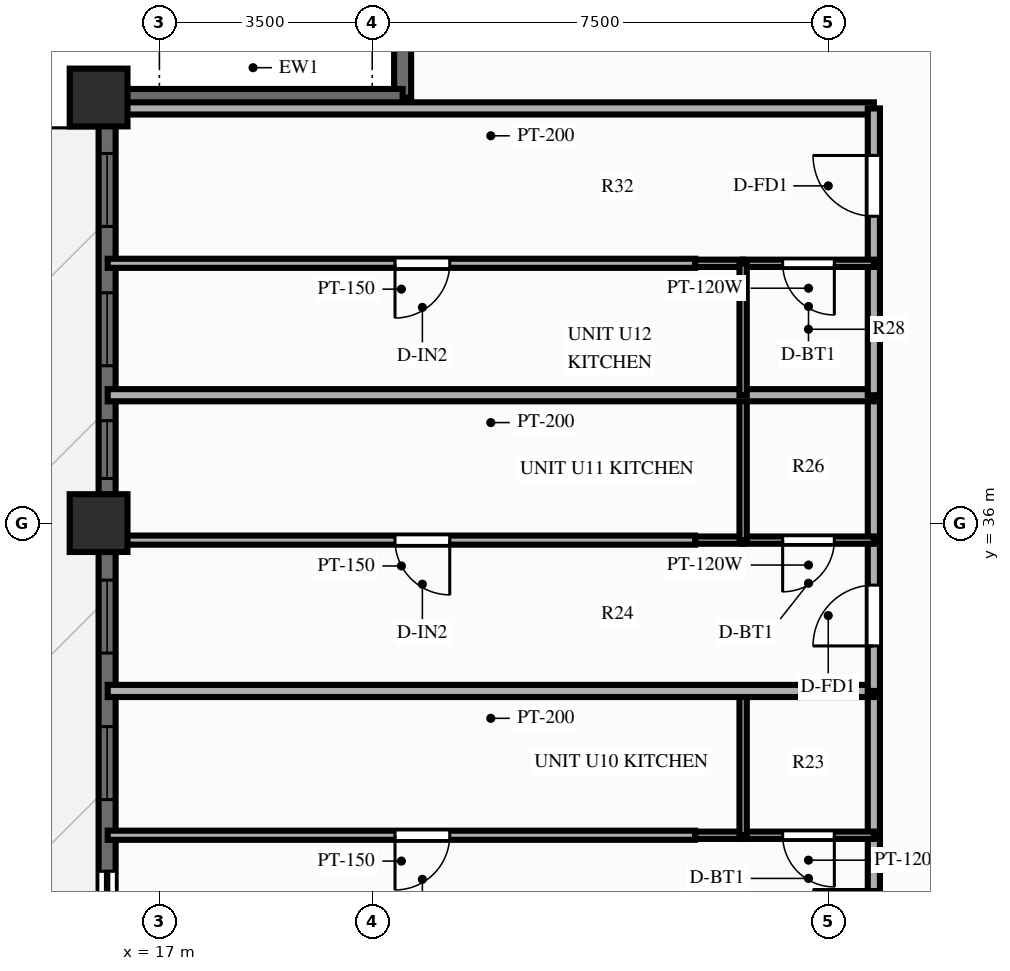
"""IFC4 building model, lengths in metres.
Left out: names, types, materials, properties, quantities, classifications, styles, units other than length and angle.
Written with IfcOpenShell. Run it as: python <this file> out.ifc"""

import sys

from ifc_helpers import new_model, si_unit, direction, frame, frame_2d, origin, origin_2d, place, context, subcontext, project, spatial, rectangle, extrude, source, transform, mapped, element, fill, save


model = new_model("IFC4")
c1 = context("Model", 3, precision=1e-05, world=origin(), true_north=direction((0.0, 1.0)))
c2 = subcontext(c1, "Body", "Model", "MODEL_VIEW")
j1 = project(units=[si_unit("LENGTHUNIT", "METRE"), si_unit("PLANEANGLEUNIT", "RADIAN")], contexts=[c1])
p1 = place(None, origin())
s1 = spatial("IfcSite", under=j1, at=p1, CompositionType="ELEMENT")
p2 = place(p1, origin())
s2 = spatial("IfcBuilding", under=s1, at=p2, CompositionType="ELEMENT")
p3 = place(p2, frame((0.0, 0.0, 163.0)))
s3 = spatial("IfcBuildingStorey", under=s2, at=p3, CompositionType="ELEMENT", Elevation=163.0)
m1 = source(origin(), c2, "Body", "SweptSolid", [
    extrude(rectangle(XDim=0.95, YDim=0.95, at=origin_2d()), origin(), (0.0, 0.0, 1.0), 3.0),
])
for number, where, z_axis, x_axis in (
    (1, (16.0, 43.0, 0.0), (0.0, 0.0, 1.0), (1.0, 0.0, 0.0)),
    (2, (16.0, 36.0, 0.0), (0.0, 0.0, 1.0), (1.0, 0.0, 0.0)),
):
    element("IfcColumn", number, at=place(p3, frame(where, z_axis=z_axis, x_axis=x_axis)), inside=s3, PredefinedType="COLUMN", context=c2, shape_type="MappedRepresentation", body=[
        mapped(m1, transform((0.0, 0.0, 0.0), scale=1.0)),
    ])
p4 = place(p3, frame((16.14, 11.0, 0.0), z_axis=(0.0, 0.0, 1.0), x_axis=(0.0, 1.0, 0.0)))
e3 = element("IfcWall", 3, at=p4, inside=s3, PredefinedType="SOLIDWALL", context=c2, shape_type="SweptSolid", body=[
    extrude(rectangle(XDim=32.0, YDim=0.28, at=frame_2d((16.0, 0.0))), origin(), (0.0, 0.0, 1.0), 2.28),
])
p5 = place(p4, frame((1.001, 0.0, 0.25)))
e4 = element("IfcOpeningElement", 4, at=p5, cuts=e3, PredefinedType="OPENING", context=c2, shape_type="SweptSolid", body=[
    extrude(rectangle(XDim=1.2, YDim=1.5, at=frame_2d((0.6, 0.75))), frame((0.0, 0.152, 0.0), z_axis=(0.0, -1.0, 0.0), x_axis=(1.0, 0.0, 0.0)), (0.0, 0.0, 1.0), 0.304),
])
p6 = place(p4, frame((3.439, 0.0, 0.25)))
e5 = element("IfcOpeningElement", 5, at=p6, cuts=e3, PredefinedType="OPENING", context=c2, shape_type="SweptSolid", body=[
    extrude(rectangle(XDim=1.2, YDim=1.5, at=frame_2d((0.6, 0.75))), frame((0.0, 0.152, 0.0), z_axis=(0.0, -1.0, 0.0), x_axis=(1.0, 0.0, 0.0)), (0.0, 0.0, 1.0), 0.304),
])
p7 = place(p4, frame((5.588, 0.0, 0.25)))
e6 = element("IfcOpeningElement", 6, at=p7, cuts=e3, PredefinedType="OPENING", context=c2, shape_type="SweptSolid", body=[
    extrude(rectangle(XDim=0.7, YDim=1.5, at=frame_2d((0.35, 0.75))), frame((0.0, 0.152, 0.0), z_axis=(0.0, -1.0, 0.0), x_axis=(1.0, 0.0, 0.0)), (0.0, 0.0, 1.0), 0.304),
])
p8 = place(p4, frame((8.085, 0.0, 0.25)))
e7 = element("IfcOpeningElement", 7, at=p8, cuts=e3, PredefinedType="OPENING", context=c2, shape_type="SweptSolid", body=[
    extrude(rectangle(XDim=1.2, YDim=1.5, at=frame_2d((0.6, 0.75))), frame((0.0, 0.152, 0.0), z_axis=(0.0, -1.0, 0.0), x_axis=(1.0, 0.0, 0.0)), (0.0, 0.0, 1.0), 0.304),
])
p9 = place(p4, frame((10.575, 0.0, 0.25)))
e8 = element("IfcOpeningElement", 8, at=p9, cuts=e3, PredefinedType="OPENING", context=c2, shape_type="SweptSolid", body=[
    extrude(rectangle(XDim=1.2, YDim=1.5, at=frame_2d((0.6, 0.75))), frame((0.0, 0.152, 0.0), z_axis=(0.0, -1.0, 0.0), x_axis=(1.0, 0.0, 0.0)), (0.0, 0.0, 1.0), 0.304),
])
p10 = place(p4, frame((13.007, 0.0, 0.25)))
e9 = element("IfcOpeningElement", 9, at=p10, cuts=e3, PredefinedType="OPENING", context=c2, shape_type="SweptSolid", body=[
    extrude(rectangle(XDim=1.2, YDim=1.5, at=frame_2d((0.6, 0.75))), frame((0.0, 0.152, 0.0), z_axis=(0.0, -1.0, 0.0), x_axis=(1.0, 0.0, 0.0)), (0.0, 0.0, 1.0), 0.304),
])
p11 = place(p4, frame((15.4, 0.0, 0.25)))
e10 = element("IfcOpeningElement", 10, at=p11, cuts=e3, PredefinedType="OPENING", context=c2, shape_type="SweptSolid", body=[
    extrude(rectangle(XDim=1.2, YDim=1.5, at=frame_2d((0.6, 0.75))), frame((0.0, 0.152, 0.0), z_axis=(0.0, -1.0, 0.0), x_axis=(1.0, 0.0, 0.0)), (0.0, 0.0, 1.0), 0.304),
])
p12 = place(p4, frame((17.673, 0.0, 0.0)))
e11 = element("IfcOpeningElement", 11, at=p12, cuts=e3, PredefinedType="OPENING", context=c2, shape_type="SweptSolid", body=[
    extrude(rectangle(XDim=1.6, YDim=2.15, at=frame_2d((0.8, 1.075))), frame((0.0, 0.152, 0.0), z_axis=(0.0, -1.0, 0.0), x_axis=(1.0, 0.0, 0.0)), (0.0, 0.0, 1.0), 0.304),
])
p13 = place(p4, frame((20.452, 0.0, 0.25)))
e12 = element("IfcOpeningElement", 12, at=p13, cuts=e3, PredefinedType="OPENING", context=c2, shape_type="SweptSolid", body=[
    extrude(rectangle(XDim=1.2, YDim=1.5, at=frame_2d((0.6, 0.75))), frame((0.0, 0.152, 0.0), z_axis=(0.0, -1.0, 0.0), x_axis=(1.0, 0.0, 0.0)), (0.0, 0.0, 1.0), 0.304),
])
p14 = place(p4, frame((22.862, 0.0, 0.25)))
e13 = element("IfcOpeningElement", 13, at=p14, cuts=e3, PredefinedType="OPENING", context=c2, shape_type="SweptSolid", body=[
    extrude(rectangle(XDim=1.2, YDim=1.5, at=frame_2d((0.6, 0.75))), frame((0.0, 0.152, 0.0), z_axis=(0.0, -1.0, 0.0), x_axis=(1.0, 0.0, 0.0)), (0.0, 0.0, 1.0), 0.304),
])
p15 = place(p4, frame((25.734, 0.0, 0.25)))
e14 = element("IfcOpeningElement", 14, at=p15, cuts=e3, PredefinedType="OPENING", context=c2, shape_type="SweptSolid", body=[
    extrude(rectangle(XDim=0.95, YDim=1.5, at=frame_2d((0.475, 0.75))), frame((0.0, 0.152, 0.0), z_axis=(0.0, -1.0, 0.0), x_axis=(1.0, 0.0, 0.0)), (0.0, 0.0, 1.0), 0.304),
])
p16 = place(p4, frame((27.588, 0.0, 0.25)))
e15 = element("IfcOpeningElement", 15, at=p16, cuts=e3, PredefinedType="OPENING", context=c2, shape_type="SweptSolid", body=[
    extrude(rectangle(XDim=1.2, YDim=1.5, at=frame_2d((0.6, 0.75))), frame((0.0, 0.152, 0.0), z_axis=(0.0, -1.0, 0.0), x_axis=(1.0, 0.0, 0.0)), (0.0, 0.0, 1.0), 0.304),
])
p17 = place(p4, frame((29.879, 0.0, 0.25)))
e16 = element("IfcOpeningElement", 16, at=p17, cuts=e3, PredefinedType="OPENING", context=c2, shape_type="SweptSolid", body=[
    extrude(rectangle(XDim=1.2, YDim=1.5, at=frame_2d((0.6, 0.75))), frame((0.0, 0.152, 0.0), z_axis=(0.0, -1.0, 0.0), x_axis=(1.0, 0.0, 0.0)), (0.0, 0.0, 1.0), 0.304),
])
for number, where, z_axis, x_axis in (
    (17, (21.0, 43.0, 0.0), (0.0, 0.0, 1.0), (0.0, 1.0, 0.0)),
    (18, (16.08, 43.0, 0.0), (0.0, 0.0, 1.0), (1.0, 0.0, 0.0)),
):
    element("IfcWall", number, at=place(p3, frame(where, z_axis=z_axis, x_axis=x_axis)), inside=s3, PredefinedType="SOLIDWALL", context=c2, shape_type="SweptSolid", body=[
        extrude(rectangle(XDim=4.92, YDim=0.28, at=frame_2d((2.46, 0.0))), origin(), (0.0, 0.0, 1.0), 2.28),
    ])
p18 = place(p3, frame((28.75, 42.82, 0.0), z_axis=(0.0, 0.0, 1.0), x_axis=(-1.0, 0.0, 0.0)))
e19 = element("IfcWall", 19, at=p18, inside=s3, PredefinedType="PARTITIONING", context=c2, shape_type="SweptSolid", body=[
    extrude(rectangle(XDim=12.6, YDim=0.2, at=frame_2d((6.3, 0.0))), origin(), (0.0, 0.0, 1.0), 2.79),
])
p19 = place(p3, frame((28.75, 28.08, 0.0), z_axis=(0.0, 0.0, 1.0), x_axis=(0.0, 1.0, 0.0)))
e20 = element("IfcWall", 20, at=p19, inside=s3, PredefinedType="PARTITIONING", context=c2, shape_type="SweptSolid", body=[
    extrude(rectangle(XDim=2.786, YDim=0.2, at=frame_2d((1.393, 0.0))), origin(), (0.0, 0.0, 1.0), 2.79),
])
p20 = place(p19, frame((0.893, 0.0, 0.0)))
e21 = element("IfcOpeningElement", 21, at=p20, cuts=e20, PredefinedType="OPENING", context=c2, shape_type="SweptSolid", body=[
    extrude(rectangle(XDim=1.0, YDim=2.15, at=frame_2d((0.5, 1.075))), frame((0.0, 0.112, 0.0), z_axis=(0.0, -1.0, 0.0), x_axis=(1.0, 0.0, 0.0)), (0.0, 0.0, 1.0), 0.224),
])
p21 = place(p3, frame((28.75, 30.866, 0.0), z_axis=(0.0, 0.0, 1.0), x_axis=(0.0, 1.0, 0.0)))
e22 = element("IfcWall", 22, at=p21, inside=s3, PredefinedType="PARTITIONING", context=c2, shape_type="SweptSolid", body=[
    extrude(rectangle(XDim=2.373, YDim=0.2, at=frame_2d((1.187, 0.0))), origin(), (0.0, 0.0, 1.0), 2.79),
])
p22 = place(p3, frame((28.75, 30.866, 0.0), z_axis=(0.0, 0.0, 1.0), x_axis=(-1.0, 0.0, 0.0)))
e23 = element("IfcWall", 23, at=p22, inside=s3, PredefinedType="PARTITIONING", context=c2, shape_type="SweptSolid", body=[
    extrude(rectangle(XDim=2.15, YDim=0.12, at=frame_2d((1.075, 0.0))), origin(), (0.0, 0.0, 1.0), 2.79),
])
p23 = place(p22, frame((0.65, 0.0, 0.0)))
e24 = element("IfcOpeningElement", 24, at=p23, cuts=e23, PredefinedType="OPENING", context=c2, shape_type="SweptSolid", body=[
    extrude(rectangle(XDim=0.85, YDim=2.05, at=frame_2d((0.425, 1.025))), frame((0.0, 0.072, 0.0), z_axis=(0.0, -1.0, 0.0), x_axis=(1.0, 0.0, 0.0)), (0.0, 0.0, 1.0), 0.144),
])
p24 = place(p3, frame((26.6, 30.866, 0.0), z_axis=(0.0, 0.0, 1.0), x_axis=(-1.0, 0.0, 0.0)))
e25 = element("IfcWall", 25, at=p24, inside=s3, PredefinedType="PARTITIONING", context=c2, shape_type="SweptSolid", body=[
    extrude(rectangle(XDim=0.79, YDim=0.12, at=frame_2d((0.395, 0.0))), origin(), (0.0, 0.0, 1.0), 2.79),
])
p25 = place(p3, frame((26.6, 30.866, 0.0), z_axis=(0.0, 0.0, 1.0), x_axis=(0.0, 1.0, 0.0)))
e26 = element("IfcWall", 26, at=p25, inside=s3, PredefinedType="PARTITIONING", context=c2, shape_type="SweptSolid", body=[
    extrude(rectangle(XDim=2.373, YDim=0.12, at=frame_2d((1.187, 0.0))), origin(), (0.0, 0.0, 1.0), 2.79),
])
p26 = place(p3, frame((25.81, 30.866, 0.0), z_axis=(0.0, 0.0, 1.0), x_axis=(-1.0, 0.0, 0.0)))
e27 = element("IfcWall", 27, at=p26, inside=s3, PredefinedType="PARTITIONING", context=c2, shape_type="SweptSolid", body=[
    extrude(rectangle(XDim=9.66, YDim=0.15, at=frame_2d((4.83, 0.0))), origin(), (0.0, 0.0, 1.0), 2.79),
])
p27 = place(p26, frame((4.035, 0.0, 0.0)))
e28 = element("IfcOpeningElement", 28, at=p27, cuts=e27, PredefinedType="OPENING", context=c2, shape_type="SweptSolid", body=[
    extrude(rectangle(XDim=0.9, YDim=2.1, at=frame_2d((0.45, 1.05))), frame((0.0, 0.087, 0.0), z_axis=(0.0, -1.0, 0.0), x_axis=(1.0, 0.0, 0.0)), (0.0, 0.0, 1.0), 0.174),
])
p28 = place(p3, frame((28.75, 33.239, 0.0), z_axis=(0.0, 0.0, 1.0), x_axis=(-1.0, 0.0, 0.0)))
e29 = element("IfcWall", 29, at=p28, inside=s3, PredefinedType="PARTITIONING", context=c2, shape_type="SweptSolid", body=[
    extrude(rectangle(XDim=12.6, YDim=0.2, at=frame_2d((6.3, 0.0))), origin(), (0.0, 0.0, 1.0), 2.79),
])
p29 = place(p3, frame((28.75, 33.239, 0.0), z_axis=(0.0, 0.0, 1.0), x_axis=(0.0, 1.0, 0.0)))
e30 = element("IfcWall", 30, at=p29, inside=s3, PredefinedType="PARTITIONING", context=c2, shape_type="SweptSolid", body=[
    extrude(rectangle(XDim=2.481, YDim=0.2, at=frame_2d((1.24, 0.0))), origin(), (0.0, 0.0, 1.0), 2.79),
])
p30 = place(p29, frame((0.74, 0.0, 0.0)))
e31 = element("IfcOpeningElement", 31, at=p30, cuts=e30, PredefinedType="OPENING", context=c2, shape_type="SweptSolid", body=[
    extrude(rectangle(XDim=1.0, YDim=2.15, at=frame_2d((0.5, 1.075))), frame((0.0, 0.112, 0.0), z_axis=(0.0, -1.0, 0.0), x_axis=(1.0, 0.0, 0.0)), (0.0, 0.0, 1.0), 0.224),
])
p31 = place(p3, frame((28.75, 35.72, 0.0), z_axis=(0.0, 0.0, 1.0), x_axis=(0.0, 1.0, 0.0)))
e32 = element("IfcWall", 32, at=p31, inside=s3, PredefinedType="PARTITIONING", context=c2, shape_type="SweptSolid", body=[
    extrude(rectangle(XDim=2.383, YDim=0.2, at=frame_2d((1.192, 0.0))), origin(), (0.0, 0.0, 1.0), 2.79),
])
p32 = place(p3, frame((28.75, 35.72, 0.0), z_axis=(0.0, 0.0, 1.0), x_axis=(-1.0, 0.0, 0.0)))
e33 = element("IfcWall", 33, at=p32, inside=s3, PredefinedType="PARTITIONING", context=c2, shape_type="SweptSolid", body=[
    extrude(rectangle(XDim=2.15, YDim=0.12, at=frame_2d((1.075, 0.0))), origin(), (0.0, 0.0, 1.0), 2.79),
])
p33 = place(p32, frame((0.65, 0.0, 0.0)))
e34 = element("IfcOpeningElement", 34, at=p33, cuts=e33, PredefinedType="OPENING", context=c2, shape_type="SweptSolid", body=[
    extrude(rectangle(XDim=0.85, YDim=2.05, at=frame_2d((0.425, 1.025))), frame((0.0, 0.072, 0.0), z_axis=(0.0, -1.0, 0.0), x_axis=(1.0, 0.0, 0.0)), (0.0, 0.0, 1.0), 0.144),
])
p34 = place(p3, frame((26.6, 35.72, 0.0), z_axis=(0.0, 0.0, 1.0), x_axis=(-1.0, 0.0, 0.0)))
e35 = element("IfcWall", 35, at=p34, inside=s3, PredefinedType="PARTITIONING", context=c2, shape_type="SweptSolid", body=[
    extrude(rectangle(XDim=0.79, YDim=0.12, at=frame_2d((0.395, 0.0))), origin(), (0.0, 0.0, 1.0), 2.79),
])
p35 = place(p3, frame((26.6, 35.72, 0.0), z_axis=(0.0, 0.0, 1.0), x_axis=(0.0, 1.0, 0.0)))
e36 = element("IfcWall", 36, at=p35, inside=s3, PredefinedType="PARTITIONING", context=c2, shape_type="SweptSolid", body=[
    extrude(rectangle(XDim=2.383, YDim=0.12, at=frame_2d((1.192, 0.0))), origin(), (0.0, 0.0, 1.0), 2.79),
])
p36 = place(p3, frame((25.81, 35.72, 0.0), z_axis=(0.0, 0.0, 1.0), x_axis=(-1.0, 0.0, 0.0)))
e37 = element("IfcWall", 37, at=p36, inside=s3, PredefinedType="PARTITIONING", context=c2, shape_type="SweptSolid", body=[
    extrude(rectangle(XDim=9.66, YDim=0.15, at=frame_2d((4.83, 0.0))), origin(), (0.0, 0.0, 1.0), 2.79),
])
p37 = place(p36, frame((4.035, 0.0, 0.0)))
e38 = element("IfcOpeningElement", 38, at=p37, cuts=e37, PredefinedType="OPENING", context=c2, shape_type="SweptSolid", body=[
    extrude(rectangle(XDim=0.9, YDim=2.1, at=frame_2d((0.45, 1.05))), frame((0.0, 0.087, 0.0), z_axis=(0.0, -1.0, 0.0), x_axis=(1.0, 0.0, 0.0)), (0.0, 0.0, 1.0), 0.174),
])
p38 = place(p3, frame((28.75, 38.103, 0.0), z_axis=(0.0, 0.0, 1.0), x_axis=(-1.0, 0.0, 0.0)))
e39 = element("IfcWall", 39, at=p38, inside=s3, PredefinedType="PARTITIONING", context=c2, shape_type="SweptSolid", body=[
    extrude(rectangle(XDim=12.6, YDim=0.2, at=frame_2d((6.3, 0.0))), origin(), (0.0, 0.0, 1.0), 2.79),
])
p39 = place(p3, frame((28.75, 38.103, 0.0), z_axis=(0.0, 0.0, 1.0), x_axis=(0.0, 1.0, 0.0)))
e40 = element("IfcWall", 40, at=p39, inside=s3, PredefinedType="PARTITIONING", context=c2, shape_type="SweptSolid", body=[
    extrude(rectangle(XDim=2.17, YDim=0.2, at=frame_2d((1.085, 0.0))), origin(), (0.0, 0.0, 1.0), 2.79),
])
p40 = place(p3, frame((28.75, 40.273, 0.0), z_axis=(0.0, 0.0, 1.0), x_axis=(0.0, 1.0, 0.0)))
e41 = element("IfcWall", 41, at=p40, inside=s3, PredefinedType="PARTITIONING", context=c2, shape_type="SweptSolid", body=[
    extrude(rectangle(XDim=2.547, YDim=0.2, at=frame_2d((1.273, 0.0))), origin(), (0.0, 0.0, 1.0), 2.79),
])
p41 = place(p40, frame((0.774, 0.0, 0.0)))
e42 = element("IfcOpeningElement", 42, at=p41, cuts=e41, PredefinedType="OPENING", context=c2, shape_type="SweptSolid", body=[
    extrude(rectangle(XDim=1.0, YDim=2.15, at=frame_2d((0.5, 1.075))), frame((0.0, 0.112, 0.0), z_axis=(0.0, -1.0, 0.0), x_axis=(1.0, 0.0, 0.0)), (0.0, 0.0, 1.0), 0.224),
])
p42 = place(p3, frame((28.75, 40.273, 0.0), z_axis=(0.0, 0.0, 1.0), x_axis=(-1.0, 0.0, 0.0)))
e43 = element("IfcWall", 43, at=p42, inside=s3, PredefinedType="PARTITIONING", context=c2, shape_type="SweptSolid", body=[
    extrude(rectangle(XDim=2.15, YDim=0.12, at=frame_2d((1.075, 0.0))), origin(), (0.0, 0.0, 1.0), 2.79),
])
p43 = place(p42, frame((0.65, 0.0, 0.0)))
e44 = element("IfcOpeningElement", 44, at=p43, cuts=e43, PredefinedType="OPENING", context=c2, shape_type="SweptSolid", body=[
    extrude(rectangle(XDim=0.85, YDim=2.05, at=frame_2d((0.425, 1.025))), frame((0.0, 0.072, 0.0), z_axis=(0.0, -1.0, 0.0), x_axis=(1.0, 0.0, 0.0)), (0.0, 0.0, 1.0), 0.144),
])
p44 = place(p3, frame((26.6, 40.273, 0.0), z_axis=(0.0, 0.0, 1.0), x_axis=(-1.0, 0.0, 0.0)))
e45 = element("IfcWall", 45, at=p44, inside=s3, PredefinedType="PARTITIONING", context=c2, shape_type="SweptSolid", body=[
    extrude(rectangle(XDim=0.79, YDim=0.12, at=frame_2d((0.395, 0.0))), origin(), (0.0, 0.0, 1.0), 2.79),
])
p45 = place(p3, frame((26.6, 38.103, 0.0), z_axis=(0.0, 0.0, 1.0), x_axis=(0.0, 1.0, 0.0)))
e46 = element("IfcWall", 46, at=p45, inside=s3, PredefinedType="PARTITIONING", context=c2, shape_type="SweptSolid", body=[
    extrude(rectangle(XDim=2.17, YDim=0.12, at=frame_2d((1.085, 0.0))), origin(), (0.0, 0.0, 1.0), 2.79),
])
p46 = place(p3, frame((25.81, 40.273, 0.0), z_axis=(0.0, 0.0, 1.0), x_axis=(-1.0, 0.0, 0.0)))
e47 = element("IfcWall", 47, at=p46, inside=s3, PredefinedType="PARTITIONING", context=c2, shape_type="SweptSolid", body=[
    extrude(rectangle(XDim=9.66, YDim=0.15, at=frame_2d((4.83, 0.0))), origin(), (0.0, 0.0, 1.0), 2.79),
])
p47 = place(p46, frame((4.035, 0.0, 0.0)))
e48 = element("IfcOpeningElement", 48, at=p47, cuts=e47, PredefinedType="OPENING", context=c2, shape_type="SweptSolid", body=[
    extrude(rectangle(XDim=0.9, YDim=2.1, at=frame_2d((0.45, 1.05))), frame((0.0, 0.087, 0.0), z_axis=(0.0, -1.0, 0.0), x_axis=(1.0, 0.0, 0.0)), (0.0, 0.0, 1.0), 0.174),
])
m2 = source(origin(), c2, "Body", "SweptSolid", [
    extrude(rectangle(XDim=1.6, YDim=2.15, at=frame_2d((0.8, 1.075))), frame((0.0, 0.025, 0.0), z_axis=(0.0, -1.0, 0.0), x_axis=(1.0, 0.0, 0.0)), (0.0, 0.0, 1.0), 0.05),
])
p48 = place(p12, origin())
e49 = element("IfcDoor", 49, at=p48, inside=s3, OperationType="SLIDING_TO_LEFT", PredefinedType="DOOR", context=c2, shape_type="MappedRepresentation", body=[
    mapped(m2, transform((0.0, 0.0, 0.0), scale=1.0)),
])
fill(e11, e49)
m3 = source(origin(), c2, "Body", "SweptSolid", [
    extrude(rectangle(XDim=1.2, YDim=1.5, at=frame_2d((0.6, 0.75))), frame((0.0, 0.03, 0.0), z_axis=(0.0, -1.0, 0.0), x_axis=(1.0, 0.0, 0.0)), (0.0, 0.0, 1.0), 0.06),
])
p49 = place(p13, origin())
e50 = element("IfcWindow", 50, at=p49, inside=s3, PartitioningType="SINGLE_PANEL", PredefinedType="WINDOW", context=c2, shape_type="MappedRepresentation", body=[
    mapped(m3, transform((0.0, 0.0, 0.0), scale=1.0)),
])
fill(e12, e50)
p50 = place(p14, origin())
e51 = element("IfcWindow", 51, at=p50, inside=s3, PartitioningType="SINGLE_PANEL", PredefinedType="WINDOW", context=c2, shape_type="MappedRepresentation", body=[
    mapped(m3, transform((0.0, 0.0, 0.0), scale=1.0)),
])
fill(e13, e51)
m4 = source(origin(), c2, "Body", "SweptSolid", [
    extrude(rectangle(XDim=0.95, YDim=1.5, at=frame_2d((0.475, 0.75))), frame((0.0, 0.03, 0.0), z_axis=(0.0, -1.0, 0.0), x_axis=(1.0, 0.0, 0.0)), (0.0, 0.0, 1.0), 0.06),
])
p51 = place(p15, origin())
e52 = element("IfcWindow", 52, at=p51, inside=s3, PartitioningType="SINGLE_PANEL", PredefinedType="WINDOW", context=c2, shape_type="MappedRepresentation", body=[
    mapped(m4, transform((0.0, 0.0, 0.0), scale=1.0)),
])
fill(e14, e52)
p52 = place(p16, origin())
e53 = element("IfcWindow", 53, at=p52, inside=s3, PartitioningType="SINGLE_PANEL", PredefinedType="WINDOW", context=c2, shape_type="MappedRepresentation", body=[
    mapped(m3, transform((0.0, 0.0, 0.0), scale=1.0)),
])
fill(e15, e53)
p53 = place(p17, origin())
e54 = element("IfcWindow", 54, at=p53, inside=s3, PartitioningType="SINGLE_PANEL", PredefinedType="WINDOW", context=c2, shape_type="MappedRepresentation", body=[
    mapped(m3, transform((0.0, 0.0, 0.0), scale=1.0)),
])
fill(e16, e54)
m5 = source(origin(), c2, "Body", "SweptSolid", [
    extrude(rectangle(XDim=1.0, YDim=2.15, at=frame_2d((0.5, 1.075))), frame((0.0, 0.025, 0.0), z_axis=(0.0, -1.0, 0.0), x_axis=(1.0, 0.0, 0.0)), (0.0, 0.0, 1.0), 0.05),
])
p54 = place(p20, origin())
e55 = element("IfcDoor", 55, at=p54, inside=s3, OperationType="SINGLE_SWING_RIGHT", PredefinedType="DOOR", context=c2, shape_type="MappedRepresentation", body=[
    mapped(m5, transform((0.0, 0.0, 0.0), scale=1.0)),
])
fill(e21, e55)
m6 = source(origin(), c2, "Body", "SweptSolid", [
    extrude(rectangle(XDim=0.85, YDim=2.05, at=frame_2d((0.425, 1.025))), frame((0.0, 0.025, 0.0), z_axis=(0.0, -1.0, 0.0), x_axis=(1.0, 0.0, 0.0)), (0.0, 0.0, 1.0), 0.05),
])
p55 = place(p23, origin())
e56 = element("IfcDoor", 56, at=p55, inside=s3, OperationType="SINGLE_SWING_LEFT", PredefinedType="DOOR", context=c2, shape_type="MappedRepresentation", body=[
    mapped(m6, transform((0.0, 0.0, 0.0), scale=1.0)),
])
fill(e24, e56)
m7 = source(origin(), c2, "Body", "SweptSolid", [
    extrude(rectangle(XDim=0.9, YDim=2.1, at=frame_2d((0.45, 1.05))), frame((0.0, 0.025, 0.0), z_axis=(0.0, -1.0, 0.0), x_axis=(1.0, 0.0, 0.0)), (0.0, 0.0, 1.0), 0.05),
])
p56 = place(p27, origin())
e57 = element("IfcDoor", 57, at=p56, inside=s3, OperationType="SINGLE_SWING_RIGHT", PredefinedType="DOOR", context=c2, shape_type="MappedRepresentation", body=[
    mapped(m7, transform((0.0, 0.0, 0.0), scale=1.0)),
])
fill(e28, e57)
p57 = place(p30, origin())
e58 = element("IfcDoor", 58, at=p57, inside=s3, OperationType="SINGLE_SWING_LEFT", PredefinedType="DOOR", context=c2, shape_type="MappedRepresentation", body=[
    mapped(m5, transform((0.0, 0.0, 0.0), scale=1.0)),
])
fill(e31, e58)
p58 = place(p33, origin())
e59 = element("IfcDoor", 59, at=p58, inside=s3, OperationType="SINGLE_SWING_RIGHT", PredefinedType="DOOR", context=c2, shape_type="MappedRepresentation", body=[
    mapped(m6, transform((0.0, 0.0, 0.0), scale=1.0)),
])
fill(e34, e59)
p59 = place(p37, origin())
e60 = element("IfcDoor", 60, at=p59, inside=s3, OperationType="SINGLE_SWING_LEFT", PredefinedType="DOOR", context=c2, shape_type="MappedRepresentation", body=[
    mapped(m7, transform((0.0, 0.0, 0.0), scale=1.0)),
])
fill(e38, e60)
p60 = place(p41, origin())
e61 = element("IfcDoor", 61, at=p60, inside=s3, OperationType="SINGLE_SWING_RIGHT", PredefinedType="DOOR", context=c2, shape_type="MappedRepresentation", body=[
    mapped(m5, transform((0.0, 0.0, 0.0), scale=1.0)),
])
fill(e42, e61)
p61 = place(p43, origin())
e62 = element("IfcDoor", 62, at=p61, inside=s3, OperationType="SINGLE_SWING_LEFT", PredefinedType="DOOR", context=c2, shape_type="MappedRepresentation", body=[
    mapped(m6, transform((0.0, 0.0, 0.0), scale=1.0)),
])
fill(e44, e62)
p62 = place(p47, origin())
e63 = element("IfcDoor", 63, at=p62, inside=s3, OperationType="SINGLE_SWING_RIGHT", PredefinedType="DOOR", context=c2, shape_type="MappedRepresentation", body=[
    mapped(m7, transform((0.0, 0.0, 0.0), scale=1.0)),
])
fill(e48, e63)
save(model, sys.argv[1])
